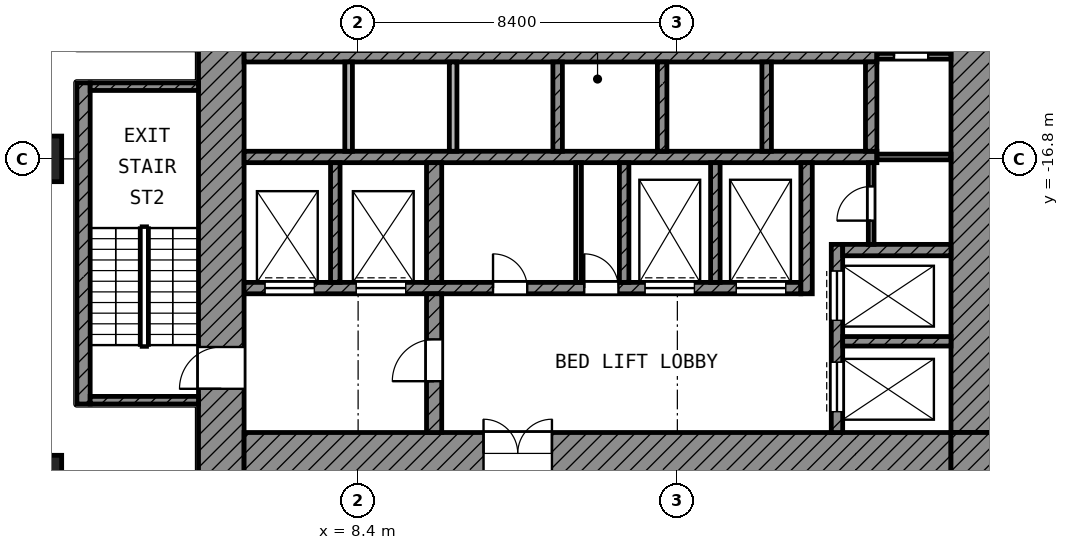
"""IFC4 building model, lengths in metres.
Left out: names, types, materials, properties, quantities, classifications, styles, units other than length and angle.
Written with IfcOpenShell. Run it as: python <this file> out.ifc"""

import sys

from ifc_helpers import new_model, si_unit, direction, frame, frame_2d, origin, origin_2d, place, context, subcontext, project, spatial, rectangle, extrude, element, fill, save


model = new_model("IFC4")
c1 = context("Model", 3, precision=1e-05, world=origin(), true_north=direction((0.0, 1.0)))
c2 = subcontext(c1, "Body", "Model", "MODEL_VIEW")
j1 = project(units=[si_unit("LENGTHUNIT", "METRE"), si_unit("PLANEANGLEUNIT", "RADIAN")], contexts=[c1])
p1 = place(None, origin())
s1 = spatial("IfcSite", under=j1, at=p1, CompositionType="ELEMENT")
p2 = place(p1, origin())
s2 = spatial("IfcBuilding", under=s1, at=p2, CompositionType="ELEMENT")
p3 = place(p2, frame((0.0, 0.0, 72.8)))
s3 = spatial("IfcBuildingStorey", under=s2, at=p3, CompositionType="ELEMENT", Elevation=72.8)
for number, where, z_axis, x_axis in (
    (1, (0.0, -16.8, 0.0), (0.0, 0.0, 1.0), (1.0, 0.0, 0.0)),
    (2, (0.0, -25.2, 0.0), (0.0, 0.0, 1.0), (1.0, 0.0, 0.0)),
):
    element("IfcColumn", number, at=place(p3, frame(where, z_axis=z_axis, x_axis=x_axis)), inside=s3, PredefinedType="COLUMN", context=c2, shape_type="SweptSolid", body=[
        extrude(rectangle(XDim=1.2, YDim=1.2, at=origin_2d()), origin(), (0.0, 0.0, 1.0), 4.2),
    ])
p4 = place(p3, frame((4.8, -25.1, 0.0), z_axis=(0.0, 0.0, 1.0), x_axis=(0.0, 1.0, 0.0)))
e3 = element("IfcWall", 3, at=p4, inside=s3, PredefinedType="SHEAR", context=c2, shape_type="SweptSolid", body=[
    extrude(rectangle(XDim=19.7, YDim=1.2, at=frame_2d((9.85, 0.0))), origin(), (0.0, 0.0, 1.0), 3.9),
])
p5 = place(p4, frame((11.55, 0.0, 0.0)))
e4 = element("IfcOpeningElement", 4, at=p5, cuts=e3, PredefinedType="OPENING", context=c2, shape_type="SweptSolid", body=[
    extrude(rectangle(XDim=1.1, YDim=2.1, at=frame_2d((0.55, 1.05))), frame((0.0, 0.61, 0.0), z_axis=(0.0, -1.0, 0.0), x_axis=(1.0, 0.0, 0.0)), (0.0, 0.0, 1.0), 1.22),
])
p6 = place(p4, frame((2.25, 0.0, 0.0)))
e5 = element("IfcOpeningElement", 5, at=p6, cuts=e3, PredefinedType="OPENING", context=c2, shape_type="SweptSolid", body=[
    extrude(rectangle(XDim=1.1, YDim=2.1, at=frame_2d((0.55, 1.05))), frame((0.0, 0.61, 0.0), z_axis=(0.0, -1.0, 0.0), x_axis=(1.0, 0.0, 0.0)), (0.0, 0.0, 1.0), 1.22),
])
p7 = place(p3, frame((24.55, -24.0, 0.0), z_axis=(0.0, 0.0, 1.0), x_axis=(0.0, 1.0, 0.0)))
e6 = element("IfcWall", 6, at=p7, inside=s3, PredefinedType="SHEAR", context=c2, shape_type="SweptSolid", body=[
    extrude(rectangle(XDim=18.6, YDim=1.1, at=frame_2d((9.3, 0.0))), origin(), (0.0, 0.0, 1.0), 3.9),
])
p8 = place(p7, frame((10.5, 0.0, 0.0)))
e7 = element("IfcOpeningElement", 7, at=p8, cuts=e6, PredefinedType="OPENING", context=c2, shape_type="SweptSolid", body=[
    extrude(rectangle(XDim=1.8, YDim=2.1, at=frame_2d((0.9, 1.05))), frame((0.0, 0.56, 0.0), z_axis=(0.0, -1.0, 0.0), x_axis=(1.0, 0.0, 0.0)), (0.0, 0.0, 1.0), 1.12),
])
p9 = place(p3, frame((5.4, -24.55, 0.0), z_axis=(0.0, 0.0, 1.0), x_axis=(1.0, 0.0, 0.0)))
e8 = element("IfcWall", 8, at=p9, inside=s3, PredefinedType="SHEAR", context=c2, shape_type="SweptSolid", body=[
    extrude(rectangle(XDim=18.6, YDim=1.1, at=frame_2d((9.3, 0.0))), origin(), (0.0, 0.0, 1.0), 3.9),
])
p10 = place(p9, frame((6.3, 0.0, 0.0)))
e9 = element("IfcOpeningElement", 9, at=p10, cuts=e8, PredefinedType="OPENING", context=c2, shape_type="SweptSolid", body=[
    extrude(rectangle(XDim=1.8, YDim=2.1, at=frame_2d((0.9, 1.05))), frame((0.0, 0.56, 0.0), z_axis=(0.0, -1.0, 0.0), x_axis=(1.0, 0.0, 0.0)), (0.0, 0.0, 1.0), 1.12),
])
p11 = place(p3, frame((24.55, -25.1, 0.0), z_axis=(0.0, 0.0, 1.0), x_axis=(0.0, 1.0, 0.0)))
e10 = element("IfcWall", 10, at=p11, inside=s3, PredefinedType="SHEAR", context=c2, shape_type="SweptSolid", body=[
    extrude(rectangle(XDim=1.1, YDim=1.1, at=frame_2d((0.55, 0.0))), origin(), (0.0, 0.0, 1.0), 3.9),
])
for number, where, z_axis, x_axis in (
    (11, (5.4, -14.1, 0.0), (0.0, 0.0, 1.0), (1.0, 0.0, 0.0)),
    (12, (5.4, -16.75, 0.0), (0.0, 0.0, 1.0), (1.0, 0.0, 0.0)),
):
    element("IfcWall", number, at=place(p3, frame(where, z_axis=z_axis, x_axis=x_axis)), inside=s3, PredefinedType="SHEAR", context=c2, shape_type="SweptSolid", body=[
        extrude(rectangle(XDim=16.65, YDim=0.3, at=frame_2d((8.325, 0.0))), origin(), (0.0, 0.0, 1.0), 3.9),
    ])
p12 = place(p3, frame((5.4, -20.2, 0.0), z_axis=(0.0, 0.0, 1.0), x_axis=(1.0, 0.0, 0.0)))
e13 = element("IfcWall", 13, at=p12, inside=s3, PredefinedType="SHEAR", context=c2, shape_type="SweptSolid", body=[
    extrude(rectangle(XDim=14.65, YDim=0.3, at=frame_2d((7.325, 0.0))), origin(), (0.0, 0.0, 1.0), 3.9),
])
p13 = place(p12, frame((10.55, 0.0, 0.0)))
e14 = element("IfcOpeningElement", 14, at=p13, cuts=e13, PredefinedType="OPENING", context=c2, shape_type="SweptSolid", body=[
    extrude(rectangle(XDim=1.3, YDim=2.1, at=frame_2d((0.65, 1.05))), frame((0.0, 0.16, 0.0), z_axis=(0.0, -1.0, 0.0), x_axis=(1.0, 0.0, 0.0)), (0.0, 0.0, 1.0), 0.32),
])
p14 = place(p12, frame((12.95, 0.0, 0.0)))
e15 = element("IfcOpeningElement", 15, at=p14, cuts=e13, PredefinedType="OPENING", context=c2, shape_type="SweptSolid", body=[
    extrude(rectangle(XDim=1.3, YDim=2.1, at=frame_2d((0.65, 1.05))), frame((0.0, 0.16, 0.0), z_axis=(0.0, -1.0, 0.0), x_axis=(1.0, 0.0, 0.0)), (0.0, 0.0, 1.0), 0.32),
])
p15 = place(p12, frame((0.55, 0.0, 0.0)))
e16 = element("IfcOpeningElement", 16, at=p15, cuts=e13, PredefinedType="OPENING", context=c2, shape_type="SweptSolid", body=[
    extrude(rectangle(XDim=1.3, YDim=2.1, at=frame_2d((0.65, 1.05))), frame((0.0, 0.16, 0.0), z_axis=(0.0, -1.0, 0.0), x_axis=(1.0, 0.0, 0.0)), (0.0, 0.0, 1.0), 0.32),
])
p16 = place(p12, frame((2.95, 0.0, 0.0)))
e17 = element("IfcOpeningElement", 17, at=p16, cuts=e13, PredefinedType="OPENING", context=c2, shape_type="SweptSolid", body=[
    extrude(rectangle(XDim=1.3, YDim=2.1, at=frame_2d((0.65, 1.05))), frame((0.0, 0.16, 0.0), z_axis=(0.0, -1.0, 0.0), x_axis=(1.0, 0.0, 0.0)), (0.0, 0.0, 1.0), 0.32),
])
p17 = place(p12, frame((6.55, 0.0, 0.0)))
e18 = element("IfcOpeningElement", 18, at=p17, cuts=e13, PredefinedType="OPENING", context=c2, shape_type="SweptSolid", body=[
    extrude(rectangle(XDim=0.9, YDim=2.1, at=frame_2d((0.45, 1.05))), frame((0.0, 0.16, 0.0), z_axis=(0.0, -1.0, 0.0), x_axis=(1.0, 0.0, 0.0)), (0.0, 0.0, 1.0), 0.32),
])
p18 = place(p12, frame((8.95, 0.0, 0.0)))
e19 = element("IfcOpeningElement", 19, at=p18, cuts=e13, PredefinedType="OPENING", context=c2, shape_type="SweptSolid", body=[
    extrude(rectangle(XDim=0.9, YDim=2.1, at=frame_2d((0.45, 1.05))), frame((0.0, 0.16, 0.0), z_axis=(0.0, -1.0, 0.0), x_axis=(1.0, 0.0, 0.0)), (0.0, 0.0, 1.0), 0.32),
])
p19 = place(p3, frame((10.4, -24.0, 0.0), z_axis=(0.0, 0.0, 1.0), x_axis=(0.0, 1.0, 0.0)))
e20 = element("IfcWall", 20, at=p19, inside=s3, PredefinedType="SHEAR", context=c2, shape_type="SweptSolid", body=[
    extrude(rectangle(XDim=3.65, YDim=0.4, at=frame_2d((1.825, 0.0))), origin(), (0.0, 0.0, 1.0), 3.9),
])
p20 = place(p19, frame((1.35, 0.0, 0.0)))
e21 = element("IfcOpeningElement", 21, at=p20, cuts=e20, PredefinedType="OPENING", context=c2, shape_type="SweptSolid", body=[
    extrude(rectangle(XDim=1.1, YDim=2.1, at=frame_2d((0.55, 1.05))), frame((0.0, 0.21, 0.0), z_axis=(0.0, -1.0, 0.0), x_axis=(1.0, 0.0, 0.0)), (0.0, 0.0, 1.0), 0.42),
])
p21 = place(p3, frame((10.4, -20.05, 0.0), z_axis=(0.0, 0.0, 1.0), x_axis=(0.0, 1.0, 0.0)))
e22 = element("IfcWall", 22, at=p21, inside=s3, PredefinedType="SHEAR", context=c2, shape_type="SweptSolid", body=[
    extrude(rectangle(XDim=3.15, YDim=0.4, at=frame_2d((1.575, 0.0))), origin(), (0.0, 0.0, 1.0), 3.9),
])
p22 = place(p3, frame((20.2, -20.35, 0.0), z_axis=(0.0, 0.0, 1.0), x_axis=(0.0, 1.0, 0.0)))
e23 = element("IfcWall", 23, at=p22, inside=s3, PredefinedType="SHEAR", context=c2, shape_type="SweptSolid", body=[
    extrude(rectangle(XDim=3.45, YDim=0.3, at=frame_2d((1.725, 0.0))), origin(), (0.0, 0.0, 1.0), 3.9),
])
p23 = place(p3, frame((21.9, -16.6, 0.0), z_axis=(0.0, 0.0, 1.0), x_axis=(0.0, 1.0, 0.0)))
e24 = element("IfcWall", 24, at=p23, inside=s3, PredefinedType="SHEAR", context=c2, shape_type="SweptSolid", body=[
    extrude(rectangle(XDim=2.35, YDim=0.3, at=frame_2d((1.175, 0.0))), origin(), (0.0, 0.0, 1.0), 3.9),
])
p24 = place(p3, frame((21.15, -19.2, 0.0), z_axis=(0.0, 0.0, 1.0), x_axis=(1.0, 0.0, 0.0)))
e25 = element("IfcWall", 25, at=p24, inside=s3, PredefinedType="SHEAR", context=c2, shape_type="SweptSolid", body=[
    extrude(rectangle(XDim=2.85, YDim=0.3, at=frame_2d((1.425, 0.0))), origin(), (0.0, 0.0, 1.0), 3.9),
])
p25 = place(p3, frame((21.0, -24.0, 0.0), z_axis=(0.0, 0.0, 1.0), x_axis=(0.0, 1.0, 0.0)))
e26 = element("IfcWall", 26, at=p25, inside=s3, PredefinedType="SHEAR", context=c2, shape_type="SweptSolid", body=[
    extrude(rectangle(XDim=4.95, YDim=0.3, at=frame_2d((2.475, 0.0))), origin(), (0.0, 0.0, 1.0), 3.9),
])
p26 = place(p25, frame((2.95, 0.0, 0.0)))
e27 = element("IfcOpeningElement", 27, at=p26, cuts=e26, PredefinedType="OPENING", context=c2, shape_type="SweptSolid", body=[
    extrude(rectangle(XDim=1.3, YDim=2.1, at=frame_2d((0.65, 1.05))), frame((0.0, 0.16, 0.0), z_axis=(0.0, -1.0, 0.0), x_axis=(1.0, 0.0, 0.0)), (0.0, 0.0, 1.0), 0.32),
])
p27 = place(p25, frame((0.55, 0.0, 0.0)))
e28 = element("IfcOpeningElement", 28, at=p27, cuts=e26, PredefinedType="OPENING", context=c2, shape_type="SweptSolid", body=[
    extrude(rectangle(XDim=1.3, YDim=2.1, at=frame_2d((0.65, 1.05))), frame((0.0, 0.16, 0.0), z_axis=(0.0, -1.0, 0.0), x_axis=(1.0, 0.0, 0.0)), (0.0, 0.0, 1.0), 0.32),
])
p28 = place(p3, frame((21.15, -21.6, 0.0), z_axis=(0.0, 0.0, 1.0), x_axis=(1.0, 0.0, 0.0)))
e29 = element("IfcWall", 29, at=p28, inside=s3, PredefinedType="SHEAR", context=c2, shape_type="SweptSolid", body=[
    extrude(rectangle(XDim=2.85, YDim=0.25, at=frame_2d((1.425, 0.0))), origin(), (0.0, 0.0, 1.0), 3.9),
])
for number, where, z_axis, x_axis in (
    (30, (7.8, -20.05, 0.0), (0.0, 0.0, 1.0), (0.0, 1.0, 0.0)),
    (31, (15.4, -20.05, 0.0), (0.0, 0.0, 1.0), (0.0, 1.0, 0.0)),
    (32, (17.8, -20.05, 0.0), (0.0, 0.0, 1.0), (0.0, 1.0, 0.0)),
):
    element("IfcWall", number, at=place(p3, frame(where, z_axis=z_axis, x_axis=x_axis)), inside=s3, PredefinedType="SHEAR", context=c2, shape_type="SweptSolid", body=[
        extrude(rectangle(XDim=3.15, YDim=0.25, at=frame_2d((1.575, 0.0))), origin(), (0.0, 0.0, 1.0), 3.9),
    ])
for number, where, z_axis, x_axis in (
    (33, (8.15, -16.6, 0.0), (0.0, 0.0, 1.0), (0.0, 1.0, 0.0)),
    (34, (10.9, -16.6, 0.0), (0.0, 0.0, 1.0), (0.0, 1.0, 0.0)),
):
    element("IfcWall", number, at=place(p3, frame(where, z_axis=z_axis, x_axis=x_axis)), inside=s3, PredefinedType="PARTITIONING", context=c2, shape_type="SweptSolid", body=[
        extrude(rectangle(XDim=2.35, YDim=0.2, at=frame_2d((1.175, 0.0))), origin(), (0.0, 0.0, 1.0), 3.9),
    ])
for number, where, z_axis, x_axis in (
    (35, (13.65, -16.6, 0.0), (0.0, 0.0, 1.0), (0.0, 1.0, 0.0)),
    (36, (16.4, -16.6, 0.0), (0.0, 0.0, 1.0), (0.0, 1.0, 0.0)),
    (37, (19.15, -16.6, 0.0), (0.0, 0.0, 1.0), (0.0, 1.0, 0.0)),
):
    element("IfcWall", number, at=place(p3, frame(where, z_axis=z_axis, x_axis=x_axis)), inside=s3, PredefinedType="SHEAR", context=c2, shape_type="SweptSolid", body=[
        extrude(rectangle(XDim=2.35, YDim=0.25, at=frame_2d((1.175, 0.0))), origin(), (0.0, 0.0, 1.0), 3.9),
    ])
p29 = place(p3, frame((21.9, -19.05, 0.0), z_axis=(0.0, 0.0, 1.0), x_axis=(0.0, 1.0, 0.0)))
e38 = element("IfcWall", 38, at=p29, inside=s3, PredefinedType="PARTITIONING", context=c2, shape_type="SweptSolid", body=[
    extrude(rectangle(XDim=2.15, YDim=0.15, at=frame_2d((1.075, 0.0))), origin(), (0.0, 0.0, 1.0), 3.9),
])
p30 = place(p29, frame((0.625, 0.0, 0.0)))
e39 = element("IfcOpeningElement", 39, at=p30, cuts=e38, PredefinedType="OPENING", context=c2, shape_type="SweptSolid", body=[
    extrude(rectangle(XDim=0.9, YDim=2.1, at=frame_2d((0.45, 1.05))), frame((0.0, 0.085, 0.0), z_axis=(0.0, -1.0, 0.0), x_axis=(1.0, 0.0, 0.0)), (0.0, 0.0, 1.0), 0.17),
])
p31 = place(p3, frame((22.05, -16.75, 0.0), z_axis=(0.0, 0.0, 1.0), x_axis=(1.0, 0.0, 0.0)))
e40 = element("IfcWall", 40, at=p31, inside=s3, PredefinedType="PARTITIONING", context=c2, shape_type="SweptSolid", body=[
    extrude(rectangle(XDim=1.95, YDim=0.15, at=frame_2d((0.975, 0.0))), origin(), (0.0, 0.0, 1.0), 3.9),
])
p32 = place(p3, frame((22.05, -14.1, 0.0), z_axis=(0.0, 0.0, 1.0), x_axis=(1.0, 0.0, 0.0)))
e41 = element("IfcWall", 41, at=p32, inside=s3, PredefinedType="PARTITIONING", context=c2, shape_type="SweptSolid", body=[
    extrude(rectangle(XDim=1.95, YDim=0.15, at=frame_2d((0.975, 0.0))), origin(), (0.0, 0.0, 1.0), 3.9),
])
p33 = place(p32, frame((0.45, 0.0, 0.0)))
e42 = element("IfcOpeningElement", 42, at=p33, cuts=e41, PredefinedType="OPENING", context=c2, shape_type="SweptSolid", body=[
    extrude(rectangle(XDim=0.9, YDim=2.1, at=frame_2d((0.45, 1.05))), frame((0.0, 0.085, 0.0), z_axis=(0.0, -1.0, 0.0), x_axis=(1.0, 0.0, 0.0)), (0.0, 0.0, 1.0), 0.17),
])
p34 = place(p3, frame((14.2, -20.05, 0.0), z_axis=(0.0, 0.0, 1.0), x_axis=(0.0, 1.0, 0.0)))
e43 = element("IfcWall", 43, at=p34, inside=s3, PredefinedType="PARTITIONING", context=c2, shape_type="SweptSolid", body=[
    extrude(rectangle(XDim=3.15, YDim=0.15, at=frame_2d((1.575, 0.0))), origin(), (0.0, 0.0, 1.0), 3.9),
])
p35 = place(p3, frame((1.175, -23.25, 0.0), z_axis=(0.0, 0.0, 1.0), x_axis=(0.0, 1.0, 0.0)))
e44 = element("IfcWall", 44, at=p35, inside=s3, PredefinedType="SHEAR", context=c2, shape_type="SweptSolid", body=[
    extrude(rectangle(XDim=8.45, YDim=0.35, at=frame_2d((4.225, 0.0))), origin(), (0.0, 0.0, 1.0), 3.9),
])
for number, where, z_axis, x_axis in (
    (45, (1.35, -14.9, 0.0), (0.0, 0.0, 1.0), (1.0, 0.0, 0.0)),
    (46, (1.35, -23.15, 0.0), (0.0, 0.0, 1.0), (1.0, 0.0, 0.0)),
):
    element("IfcWall", number, at=place(p3, frame(where, z_axis=z_axis, x_axis=x_axis)), inside=s3, PredefinedType="SHEAR", context=c2, shape_type="SweptSolid", body=[
        extrude(rectangle(XDim=2.85, YDim=0.2, at=frame_2d((1.425, 0.0))), origin(), (0.0, 0.0, 1.0), 3.9),
    ])
p36 = place(p26, origin())
e47 = element("IfcDoor", 47, at=p36, inside=s3, OperationType="DOUBLE_DOOR_SLIDING", PredefinedType="DOOR", context=c2, shape_type="SweptSolid", body=[
    extrude(rectangle(XDim=1.3, YDim=2.1, at=frame_2d((0.65, 1.05))), frame((0.0, 0.025, 0.0), z_axis=(0.0, -1.0, 0.0), x_axis=(1.0, 0.0, 0.0)), (0.0, 0.0, 1.0), 0.05),
])
fill(e27, e47)
p37 = place(p27, origin())
e48 = element("IfcDoor", 48, at=p37, inside=s3, OperationType="DOUBLE_DOOR_SLIDING", PredefinedType="DOOR", context=c2, shape_type="SweptSolid", body=[
    extrude(rectangle(XDim=1.3, YDim=2.1, at=frame_2d((0.65, 1.05))), frame((0.0, 0.025, 0.0), z_axis=(0.0, -1.0, 0.0), x_axis=(1.0, 0.0, 0.0)), (0.0, 0.0, 1.0), 0.05),
])
fill(e28, e48)
p38 = place(p13, origin())
e49 = element("IfcDoor", 49, at=p38, inside=s3, OperationType="DOUBLE_DOOR_SLIDING", PredefinedType="DOOR", context=c2, shape_type="SweptSolid", body=[
    extrude(rectangle(XDim=1.3, YDim=2.1, at=frame_2d((0.65, 1.05))), frame((0.0, 0.025, 0.0), z_axis=(0.0, -1.0, 0.0), x_axis=(1.0, 0.0, 0.0)), (0.0, 0.0, 1.0), 0.05),
])
fill(e14, e49)
p39 = place(p14, origin())
e50 = element("IfcDoor", 50, at=p39, inside=s3, OperationType="DOUBLE_DOOR_SLIDING", PredefinedType="DOOR", context=c2, shape_type="SweptSolid", body=[
    extrude(rectangle(XDim=1.3, YDim=2.1, at=frame_2d((0.65, 1.05))), frame((0.0, 0.025, 0.0), z_axis=(0.0, -1.0, 0.0), x_axis=(1.0, 0.0, 0.0)), (0.0, 0.0, 1.0), 0.05),
])
fill(e15, e50)
p40 = place(p15, origin())
e51 = element("IfcDoor", 51, at=p40, inside=s3, OperationType="DOUBLE_DOOR_SLIDING", PredefinedType="DOOR", context=c2, shape_type="SweptSolid", body=[
    extrude(rectangle(XDim=1.3, YDim=2.1, at=frame_2d((0.65, 1.05))), frame((0.0, 0.025, 0.0), z_axis=(0.0, -1.0, 0.0), x_axis=(1.0, 0.0, 0.0)), (0.0, 0.0, 1.0), 0.05),
])
fill(e16, e51)
p41 = place(p16, origin())
e52 = element("IfcDoor", 52, at=p41, inside=s3, OperationType="DOUBLE_DOOR_SLIDING", PredefinedType="DOOR", context=c2, shape_type="SweptSolid", body=[
    extrude(rectangle(XDim=1.3, YDim=2.1, at=frame_2d((0.65, 1.05))), frame((0.0, 0.025, 0.0), z_axis=(0.0, -1.0, 0.0), x_axis=(1.0, 0.0, 0.0)), (0.0, 0.0, 1.0), 0.05),
])
fill(e17, e52)
p42 = place(p6, origin())
e53 = element("IfcDoor", 53, at=p42, inside=s3, OperationType="SINGLE_SWING_LEFT", PredefinedType="DOOR", context=c2, shape_type="SweptSolid", body=[
    extrude(rectangle(XDim=1.1, YDim=2.1, at=frame_2d((0.55, 1.05))), frame((0.0, 0.025, 0.0), z_axis=(0.0, -1.0, 0.0), x_axis=(1.0, 0.0, 0.0)), (0.0, 0.0, 1.0), 0.05),
])
fill(e5, e53)
p43 = place(p20, origin())
e54 = element("IfcDoor", 54, at=p43, inside=s3, OperationType="SINGLE_SWING_LEFT", PredefinedType="DOOR", context=c2, shape_type="SweptSolid", body=[
    extrude(rectangle(XDim=1.1, YDim=2.1, at=frame_2d((0.55, 1.05))), frame((0.0, 0.025, 0.0), z_axis=(0.0, -1.0, 0.0), x_axis=(1.0, 0.0, 0.0)), (0.0, 0.0, 1.0), 0.05),
])
fill(e21, e54)
p44 = place(p10, origin())
e55 = element("IfcDoor", 55, at=p44, inside=s3, OperationType="DOUBLE_DOOR_SINGLE_SWING", PredefinedType="DOOR", context=c2, shape_type="SweptSolid", body=[
    extrude(rectangle(XDim=1.8, YDim=2.1, at=frame_2d((0.9, 1.05))), frame((0.0, 0.025, 0.0), z_axis=(0.0, -1.0, 0.0), x_axis=(1.0, 0.0, 0.0)), (0.0, 0.0, 1.0), 0.05),
])
fill(e9, e55)
p45 = place(p33, origin())
e56 = element("IfcDoor", 56, at=p45, inside=s3, OperationType="SINGLE_SWING_LEFT", PredefinedType="DOOR", context=c2, shape_type="SweptSolid", body=[
    extrude(rectangle(XDim=0.9, YDim=2.1, at=frame_2d((0.45, 1.05))), frame((0.0, 0.025, 0.0), z_axis=(0.0, -1.0, 0.0), x_axis=(1.0, 0.0, 0.0)), (0.0, 0.0, 1.0), 0.05),
])
fill(e42, e56)
p46 = place(p30, origin())
e57 = element("IfcDoor", 57, at=p46, inside=s3, OperationType="SINGLE_SWING_LEFT", PredefinedType="DOOR", context=c2, shape_type="SweptSolid", body=[
    extrude(rectangle(XDim=0.9, YDim=2.1, at=frame_2d((0.45, 1.05))), frame((0.0, 0.025, 0.0), z_axis=(0.0, -1.0, 0.0), x_axis=(1.0, 0.0, 0.0)), (0.0, 0.0, 1.0), 0.05),
])
fill(e39, e57)
p47 = place(p17, origin())
e58 = element("IfcDoor", 58, at=p47, inside=s3, OperationType="SINGLE_SWING_LEFT", PredefinedType="DOOR", context=c2, shape_type="SweptSolid", body=[
    extrude(rectangle(XDim=0.9, YDim=2.1, at=frame_2d((0.45, 1.05))), frame((0.0, 0.025, 0.0), z_axis=(0.0, -1.0, 0.0), x_axis=(1.0, 0.0, 0.0)), (0.0, 0.0, 1.0), 0.05),
])
fill(e18, e58)
p48 = place(p18, origin())
e59 = element("IfcDoor", 59, at=p48, inside=s3, OperationType="SINGLE_SWING_LEFT", PredefinedType="DOOR", context=c2, shape_type="SweptSolid", body=[
    extrude(rectangle(XDim=0.9, YDim=2.1, at=frame_2d((0.45, 1.05))), frame((0.0, 0.025, 0.0), z_axis=(0.0, -1.0, 0.0), x_axis=(1.0, 0.0, 0.0)), (0.0, 0.0, 1.0), 0.05),
])
fill(e19, e59)
save(model, sys.argv[1])
